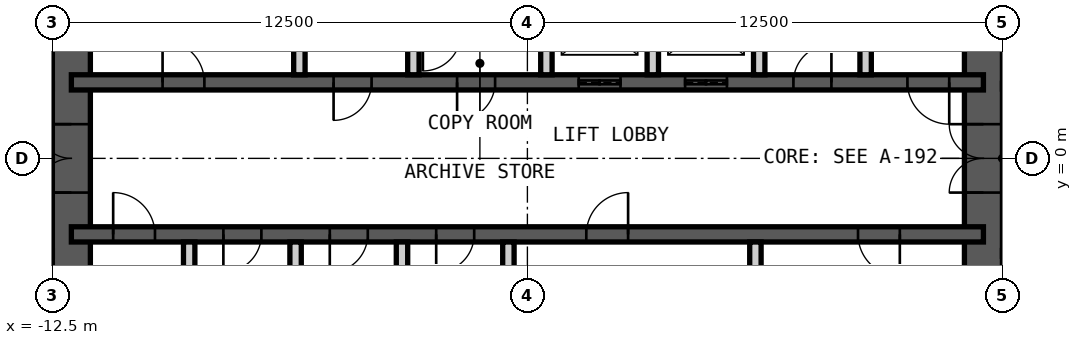
"""IFC4 building model, lengths in metres.
Left out: names, types, materials, properties, quantities, classifications, styles, units other than length and angle.
Written with IfcOpenShell. Run it as: python <this file> out.ifc"""

import sys

from ifc_helpers import new_model, si_unit, direction, frame, frame_2d, origin, place, context, subcontext, project, spatial, rectangle, extrude, element, fill, save


model = new_model("IFC4")
c1 = context("Model", 3, precision=1e-05, world=origin(), true_north=direction((0.0, 1.0)))
c2 = subcontext(c1, "Body", "Model", "MODEL_VIEW")
j1 = project(units=[si_unit("LENGTHUNIT", "METRE"), si_unit("PLANEANGLEUNIT", "RADIAN")], contexts=[c1])
p1 = place(None, origin())
s1 = spatial("IfcSite", under=j1, at=p1, CompositionType="ELEMENT")
p2 = place(p1, origin())
s2 = spatial("IfcBuilding", under=s1, at=p2, CompositionType="ELEMENT")
p3 = place(p2, frame((0.0, 0.0, 287.2)))
s3 = spatial("IfcBuildingStorey", under=s2, at=p3, CompositionType="ELEMENT", Elevation=287.2)
p4 = place(p3, frame((12.0, -9.0, 0.0), z_axis=(0.0, 0.0, 1.0), x_axis=(0.0, 1.0, 0.0)))
e1 = element("IfcWall", 1, at=p4, inside=s3, PredefinedType="SHEAR", context=c2, shape_type="SweptSolid", body=[
    extrude(rectangle(XDim=18.0, YDim=1.0, at=frame_2d((9.0, 0.0))), origin(), (0.0, 0.0, 1.0), 4.2),
])
p5 = place(p4, frame((8.1, 0.0, 0.0)))
e2 = element("IfcOpeningElement", 2, at=p5, cuts=e1, PredefinedType="OPENING", context=c2, shape_type="SweptSolid", body=[
    extrude(rectangle(XDim=1.8, YDim=2.1, at=frame_2d((0.9, 1.05))), frame((0.0, 0.51, 0.0), z_axis=(0.0, -1.0, 0.0), x_axis=(1.0, 0.0, 0.0)), (0.0, 0.0, 1.0), 1.02),
])
p6 = place(p3, frame((-12.0, -9.0, 0.0), z_axis=(0.0, 0.0, 1.0), x_axis=(0.0, 1.0, 0.0)))
e3 = element("IfcWall", 3, at=p6, inside=s3, PredefinedType="SHEAR", context=c2, shape_type="SweptSolid", body=[
    extrude(rectangle(XDim=18.0, YDim=1.0, at=frame_2d((9.0, 0.0))), origin(), (0.0, 0.0, 1.0), 4.2),
])
p7 = place(p6, frame((8.1, 0.0, 0.0)))
e4 = element("IfcOpeningElement", 4, at=p7, cuts=e3, PredefinedType="OPENING", context=c2, shape_type="SweptSolid", body=[
    extrude(rectangle(XDim=1.8, YDim=2.1, at=frame_2d((0.9, 1.05))), frame((0.0, 0.51, 0.0), z_axis=(0.0, -1.0, 0.0), x_axis=(1.0, 0.0, 0.0)), (0.0, 0.0, 1.0), 1.02),
])
p8 = place(p3, frame((-12.0, 2.0, 0.0), z_axis=(0.0, 0.0, 1.0), x_axis=(1.0, 0.0, 0.0)))
e5 = element("IfcWall", 5, at=p8, inside=s3, PredefinedType="SHEAR", context=c2, shape_type="SweptSolid", body=[
    extrude(rectangle(XDim=24.0, YDim=0.4, at=frame_2d((12.0, 0.0))), origin(), (0.0, 0.0, 1.0), 4.2),
])
p9 = place(p8, frame((2.4, 0.0, 0.0)))
e6 = element("IfcOpeningElement", 6, at=p9, cuts=e5, PredefinedType="OPENING", context=c2, shape_type="SweptSolid", body=[
    extrude(rectangle(XDim=1.1, YDim=2.1, at=frame_2d((0.55, 1.05))), frame((0.0, 0.21, 0.0), z_axis=(0.0, -1.0, 0.0), x_axis=(1.0, 0.0, 0.0)), (0.0, 0.0, 1.0), 0.42),
])
p10 = place(p8, frame((22.0, 0.0, 0.0)))
e7 = element("IfcOpeningElement", 7, at=p10, cuts=e5, PredefinedType="OPENING", context=c2, shape_type="SweptSolid", body=[
    extrude(rectangle(XDim=1.1, YDim=2.1, at=frame_2d((0.55, 1.05))), frame((0.0, 0.21, 0.0), z_axis=(0.0, -1.0, 0.0), x_axis=(1.0, 0.0, 0.0)), (0.0, 0.0, 1.0), 0.42),
])
p11 = place(p8, frame((10.15, 0.0, 0.0)))
e8 = element("IfcOpeningElement", 8, at=p11, cuts=e5, PredefinedType="OPENING", context=c2, shape_type="SweptSolid", body=[
    extrude(rectangle(XDim=1.0, YDim=2.1, at=frame_2d((0.5, 1.05))), frame((0.0, 0.21, 0.0), z_axis=(0.0, -1.0, 0.0), x_axis=(1.0, 0.0, 0.0)), (0.0, 0.0, 1.0), 0.42),
])
p12 = place(p8, frame((6.9, 0.0, 0.0)))
e9 = element("IfcOpeningElement", 9, at=p12, cuts=e5, PredefinedType="OPENING", context=c2, shape_type="SweptSolid", body=[
    extrude(rectangle(XDim=1.0, YDim=2.1, at=frame_2d((0.5, 1.05))), frame((0.0, 0.21, 0.0), z_axis=(0.0, -1.0, 0.0), x_axis=(1.0, 0.0, 0.0)), (0.0, 0.0, 1.0), 0.42),
])
p13 = place(p8, frame((13.35, 0.0, 0.0)))
e10 = element("IfcOpeningElement", 10, at=p13, cuts=e5, PredefinedType="OPENING", context=c2, shape_type="SweptSolid", body=[
    extrude(rectangle(XDim=1.1, YDim=2.4, at=frame_2d((0.55, 1.2))), frame((0.0, 0.21, 0.0), z_axis=(0.0, -1.0, 0.0), x_axis=(1.0, 0.0, 0.0)), (0.0, 0.0, 1.0), 0.42),
])
p14 = place(p8, frame((16.15, 0.0, 0.0)))
e11 = element("IfcOpeningElement", 11, at=p14, cuts=e5, PredefinedType="OPENING", context=c2, shape_type="SweptSolid", body=[
    extrude(rectangle(XDim=1.1, YDim=2.4, at=frame_2d((0.55, 1.2))), frame((0.0, 0.21, 0.0), z_axis=(0.0, -1.0, 0.0), x_axis=(1.0, 0.0, 0.0)), (0.0, 0.0, 1.0), 0.42),
])
p15 = place(p8, frame((19.0, 0.0, 0.0)))
e12 = element("IfcOpeningElement", 12, at=p15, cuts=e5, PredefinedType="OPENING", context=c2, shape_type="SweptSolid", body=[
    extrude(rectangle(XDim=1.0, YDim=2.1, at=frame_2d((0.5, 1.05))), frame((0.0, 0.21, 0.0), z_axis=(0.0, -1.0, 0.0), x_axis=(1.0, 0.0, 0.0)), (0.0, 0.0, 1.0), 0.42),
])
p16 = place(p3, frame((-12.0, -2.0, 0.0), z_axis=(0.0, 0.0, 1.0), x_axis=(1.0, 0.0, 0.0)))
e13 = element("IfcWall", 13, at=p16, inside=s3, PredefinedType="SHEAR", context=c2, shape_type="SweptSolid", body=[
    extrude(rectangle(XDim=24.0, YDim=0.4, at=frame_2d((12.0, 0.0))), origin(), (0.0, 0.0, 1.0), 4.2),
])
p17 = place(p16, frame((1.1, 0.0, 0.0)))
e14 = element("IfcOpeningElement", 14, at=p17, cuts=e13, PredefinedType="OPENING", context=c2, shape_type="SweptSolid", body=[
    extrude(rectangle(XDim=1.1, YDim=2.1, at=frame_2d((0.55, 1.05))), frame((0.0, 0.21, 0.0), z_axis=(0.0, -1.0, 0.0), x_axis=(1.0, 0.0, 0.0)), (0.0, 0.0, 1.0), 0.42),
])
p18 = place(p16, frame((13.55, 0.0, 0.0)))
e15 = element("IfcOpeningElement", 15, at=p18, cuts=e13, PredefinedType="OPENING", context=c2, shape_type="SweptSolid", body=[
    extrude(rectangle(XDim=1.1, YDim=2.1, at=frame_2d((0.55, 1.05))), frame((0.0, 0.21, 0.0), z_axis=(0.0, -1.0, 0.0), x_axis=(1.0, 0.0, 0.0)), (0.0, 0.0, 1.0), 0.42),
])
p19 = place(p16, frame((20.7, 0.0, 0.0)))
e16 = element("IfcOpeningElement", 16, at=p19, cuts=e13, PredefinedType="OPENING", context=c2, shape_type="SweptSolid", body=[
    extrude(rectangle(XDim=1.1, YDim=2.1, at=frame_2d((0.55, 1.05))), frame((0.0, 0.21, 0.0), z_axis=(0.0, -1.0, 0.0), x_axis=(1.0, 0.0, 0.0)), (0.0, 0.0, 1.0), 0.42),
])
p20 = place(p16, frame((4.0, 0.0, 0.0)))
e17 = element("IfcOpeningElement", 17, at=p20, cuts=e13, PredefinedType="OPENING", context=c2, shape_type="SweptSolid", body=[
    extrude(rectangle(XDim=1.0, YDim=2.1, at=frame_2d((0.5, 1.05))), frame((0.0, 0.21, 0.0), z_axis=(0.0, -1.0, 0.0), x_axis=(1.0, 0.0, 0.0)), (0.0, 0.0, 1.0), 0.42),
])
p21 = place(p16, frame((6.8, 0.0, 0.0)))
e18 = element("IfcOpeningElement", 18, at=p21, cuts=e13, PredefinedType="OPENING", context=c2, shape_type="SweptSolid", body=[
    extrude(rectangle(XDim=1.0, YDim=2.1, at=frame_2d((0.5, 1.05))), frame((0.0, 0.21, 0.0), z_axis=(0.0, -1.0, 0.0), x_axis=(1.0, 0.0, 0.0)), (0.0, 0.0, 1.0), 0.42),
])
p22 = place(p16, frame((9.6, 0.0, 0.0)))
e19 = element("IfcOpeningElement", 19, at=p22, cuts=e13, PredefinedType="OPENING", context=c2, shape_type="SweptSolid", body=[
    extrude(rectangle(XDim=1.0, YDim=2.1, at=frame_2d((0.5, 1.05))), frame((0.0, 0.21, 0.0), z_axis=(0.0, -1.0, 0.0), x_axis=(1.0, 0.0, 0.0)), (0.0, 0.0, 1.0), 0.42),
])
for number, where, z_axis, x_axis in (
    (20, (-6.0, 2.2, 0.0), (0.0, 0.0, 1.0), (0.0, 1.0, 0.0)),
    (21, (-3.0, 2.2, 0.0), (0.0, 0.0, 1.0), (0.0, 1.0, 0.0)),
    (22, (0.5, 2.2, 0.0), (0.0, 0.0, 1.0), (0.0, 1.0, 0.0)),
    (23, (3.3, 2.2, 0.0), (0.0, 0.0, 1.0), (0.0, 1.0, 0.0)),
    (24, (6.1, 2.2, 0.0), (0.0, 0.0, 1.0), (0.0, 1.0, 0.0)),
    (25, (8.9, 2.2, 0.0), (0.0, 0.0, 1.0), (0.0, 1.0, 0.0)),
    (26, (-8.9, -4.85, 0.0), (0.0, 0.0, 1.0), (0.0, 1.0, 0.0)),
    (27, (-6.1, -4.85, 0.0), (0.0, 0.0, 1.0), (0.0, 1.0, 0.0)),
    (28, (-3.3, -4.85, 0.0), (0.0, 0.0, 1.0), (0.0, 1.0, 0.0)),
    (29, (-0.5, -4.85, 0.0), (0.0, 0.0, 1.0), (0.0, 1.0, 0.0)),
    (30, (6.0, -4.85, 0.0), (0.0, 0.0, 1.0), (0.0, 1.0, 0.0)),
):
    element("IfcWall", number, at=place(p3, frame(where, z_axis=z_axis, x_axis=x_axis)), inside=s3, PredefinedType="PARTITIONING", context=c2, shape_type="SweptSolid", body=[
        extrude(rectangle(XDim=2.65, YDim=0.3, at=frame_2d((1.325, 0.0))), origin(), (0.0, 0.0, 1.0), 3.98),
    ])
p23 = place(p9, origin())
e31 = element("IfcDoor", 31, at=p23, inside=s3, OperationType="SINGLE_SWING_RIGHT", PredefinedType="DOOR", context=c2, shape_type="SweptSolid", body=[
    extrude(rectangle(XDim=1.1, YDim=2.1, at=frame_2d((0.55, 1.05))), frame((0.0, 0.025, 0.0), z_axis=(0.0, -1.0, 0.0), x_axis=(1.0, 0.0, 0.0)), (0.0, 0.0, 1.0), 0.05),
])
fill(e6, e31)
p24 = place(p17, origin())
e32 = element("IfcDoor", 32, at=p24, inside=s3, OperationType="SINGLE_SWING_RIGHT", PredefinedType="DOOR", context=c2, shape_type="SweptSolid", body=[
    extrude(rectangle(XDim=1.1, YDim=2.1, at=frame_2d((0.55, 1.05))), frame((0.0, 0.025, 0.0), z_axis=(0.0, -1.0, 0.0), x_axis=(1.0, 0.0, 0.0)), (0.0, 0.0, 1.0), 0.05),
])
fill(e14, e32)
p25 = place(p10, origin())
e33 = element("IfcDoor", 33, at=p25, inside=s3, OperationType="SINGLE_SWING_RIGHT", PredefinedType="DOOR", context=c2, shape_type="SweptSolid", body=[
    extrude(rectangle(XDim=1.1, YDim=2.1, at=frame_2d((0.55, 1.05))), frame((0.0, 0.025, 0.0), z_axis=(0.0, -1.0, 0.0), x_axis=(1.0, 0.0, 0.0)), (0.0, 0.0, 1.0), 0.05),
])
fill(e7, e33)
p26 = place(p11, origin())
e34 = element("IfcDoor", 34, at=p26, inside=s3, OperationType="SINGLE_SWING_LEFT", PredefinedType="DOOR", context=c2, shape_type="SweptSolid", body=[
    extrude(rectangle(XDim=1.0, YDim=2.1, at=frame_2d((0.5, 1.05))), frame((0.0, 0.025, 0.0), z_axis=(0.0, -1.0, 0.0), x_axis=(1.0, 0.0, 0.0)), (0.0, 0.0, 1.0), 0.05),
])
fill(e8, e34)
p27 = place(p18, origin())
e35 = element("IfcDoor", 35, at=p27, inside=s3, OperationType="SINGLE_SWING_LEFT", PredefinedType="DOOR", context=c2, shape_type="SweptSolid", body=[
    extrude(rectangle(XDim=1.1, YDim=2.1, at=frame_2d((0.55, 1.05))), frame((0.0, 0.025, 0.0), z_axis=(0.0, -1.0, 0.0), x_axis=(1.0, 0.0, 0.0)), (0.0, 0.0, 1.0), 0.05),
])
fill(e15, e35)
p28 = place(p19, origin())
e36 = element("IfcDoor", 36, at=p28, inside=s3, OperationType="SINGLE_SWING_RIGHT", PredefinedType="DOOR", context=c2, shape_type="SweptSolid", body=[
    extrude(rectangle(XDim=1.1, YDim=2.1, at=frame_2d((0.55, 1.05))), frame((0.0, 0.025, 0.0), z_axis=(0.0, -1.0, 0.0), x_axis=(1.0, 0.0, 0.0)), (0.0, 0.0, 1.0), 0.05),
])
fill(e16, e36)
p29 = place(p5, origin())
e37 = element("IfcDoor", 37, at=p29, inside=s3, OperationType="DOUBLE_DOOR_DOUBLE_SWING", PredefinedType="DOOR", context=c2, shape_type="SweptSolid", body=[
    extrude(rectangle(XDim=1.8, YDim=2.1, at=frame_2d((0.9, 1.05))), frame((0.0, 0.025, 0.0), z_axis=(0.0, -1.0, 0.0), x_axis=(1.0, 0.0, 0.0)), (0.0, 0.0, 1.0), 0.05),
])
fill(e2, e37)
p30 = place(p7, origin())
e38 = element("IfcDoor", 38, at=p30, inside=s3, OperationType="DOUBLE_DOOR_DOUBLE_SWING", PredefinedType="DOOR", context=c2, shape_type="SweptSolid", body=[
    extrude(rectangle(XDim=1.8, YDim=2.1, at=frame_2d((0.9, 1.05))), frame((0.0, 0.025, 0.0), z_axis=(0.0, -1.0, 0.0), x_axis=(1.0, 0.0, 0.0)), (0.0, 0.0, 1.0), 0.05),
])
fill(e4, e38)
p31 = place(p12, origin())
e39 = element("IfcDoor", 39, at=p31, inside=s3, OperationType="SINGLE_SWING_LEFT", PredefinedType="DOOR", context=c2, shape_type="SweptSolid", body=[
    extrude(rectangle(XDim=1.0, YDim=2.1, at=frame_2d((0.5, 1.05))), frame((0.0, 0.025, 0.0), z_axis=(0.0, -1.0, 0.0), x_axis=(1.0, 0.0, 0.0)), (0.0, 0.0, 1.0), 0.05),
])
fill(e9, e39)
p32 = place(p13, origin())
e40 = element("IfcDoor", 40, at=p32, inside=s3, OperationType="DOUBLE_DOOR_SLIDING", PredefinedType="DOOR", context=c2, shape_type="SweptSolid", body=[
    extrude(rectangle(XDim=1.1, YDim=2.4, at=frame_2d((0.55, 1.2))), frame((0.0, 0.025, 0.0), z_axis=(0.0, -1.0, 0.0), x_axis=(1.0, 0.0, 0.0)), (0.0, 0.0, 1.0), 0.05),
])
fill(e10, e40)
p33 = place(p14, origin())
e41 = element("IfcDoor", 41, at=p33, inside=s3, OperationType="DOUBLE_DOOR_SLIDING", PredefinedType="DOOR", context=c2, shape_type="SweptSolid", body=[
    extrude(rectangle(XDim=1.1, YDim=2.4, at=frame_2d((0.55, 1.2))), frame((0.0, 0.025, 0.0), z_axis=(0.0, -1.0, 0.0), x_axis=(1.0, 0.0, 0.0)), (0.0, 0.0, 1.0), 0.05),
])
fill(e11, e41)
p34 = place(p15, origin())
e42 = element("IfcDoor", 42, at=p34, inside=s3, OperationType="SINGLE_SWING_LEFT", PredefinedType="DOOR", context=c2, shape_type="SweptSolid", body=[
    extrude(rectangle(XDim=1.0, YDim=2.1, at=frame_2d((0.5, 1.05))), frame((0.0, 0.025, 0.0), z_axis=(0.0, -1.0, 0.0), x_axis=(1.0, 0.0, 0.0)), (0.0, 0.0, 1.0), 0.05),
])
fill(e12, e42)
p35 = place(p20, origin())
e43 = element("IfcDoor", 43, at=p35, inside=s3, OperationType="SINGLE_SWING_LEFT", PredefinedType="DOOR", context=c2, shape_type="SweptSolid", body=[
    extrude(rectangle(XDim=1.0, YDim=2.1, at=frame_2d((0.5, 1.05))), frame((0.0, 0.025, 0.0), z_axis=(0.0, -1.0, 0.0), x_axis=(1.0, 0.0, 0.0)), (0.0, 0.0, 1.0), 0.05),
])
fill(e17, e43)
p36 = place(p21, origin())
e44 = element("IfcDoor", 44, at=p36, inside=s3, OperationType="SINGLE_SWING_LEFT", PredefinedType="DOOR", context=c2, shape_type="SweptSolid", body=[
    extrude(rectangle(XDim=1.0, YDim=2.1, at=frame_2d((0.5, 1.05))), frame((0.0, 0.025, 0.0), z_axis=(0.0, -1.0, 0.0), x_axis=(1.0, 0.0, 0.0)), (0.0, 0.0, 1.0), 0.05),
])
fill(e18, e44)
p37 = place(p22, origin())
e45 = element("IfcDoor", 45, at=p37, inside=s3, OperationType="SINGLE_SWING_LEFT", PredefinedType="DOOR", context=c2, shape_type="SweptSolid", body=[
    extrude(rectangle(XDim=1.0, YDim=2.1, at=frame_2d((0.5, 1.05))), frame((0.0, 0.025, 0.0), z_axis=(0.0, -1.0, 0.0), x_axis=(1.0, 0.0, 0.0)), (0.0, 0.0, 1.0), 0.05),
])
fill(e19, e45)
save(model, sys.argv[1])
